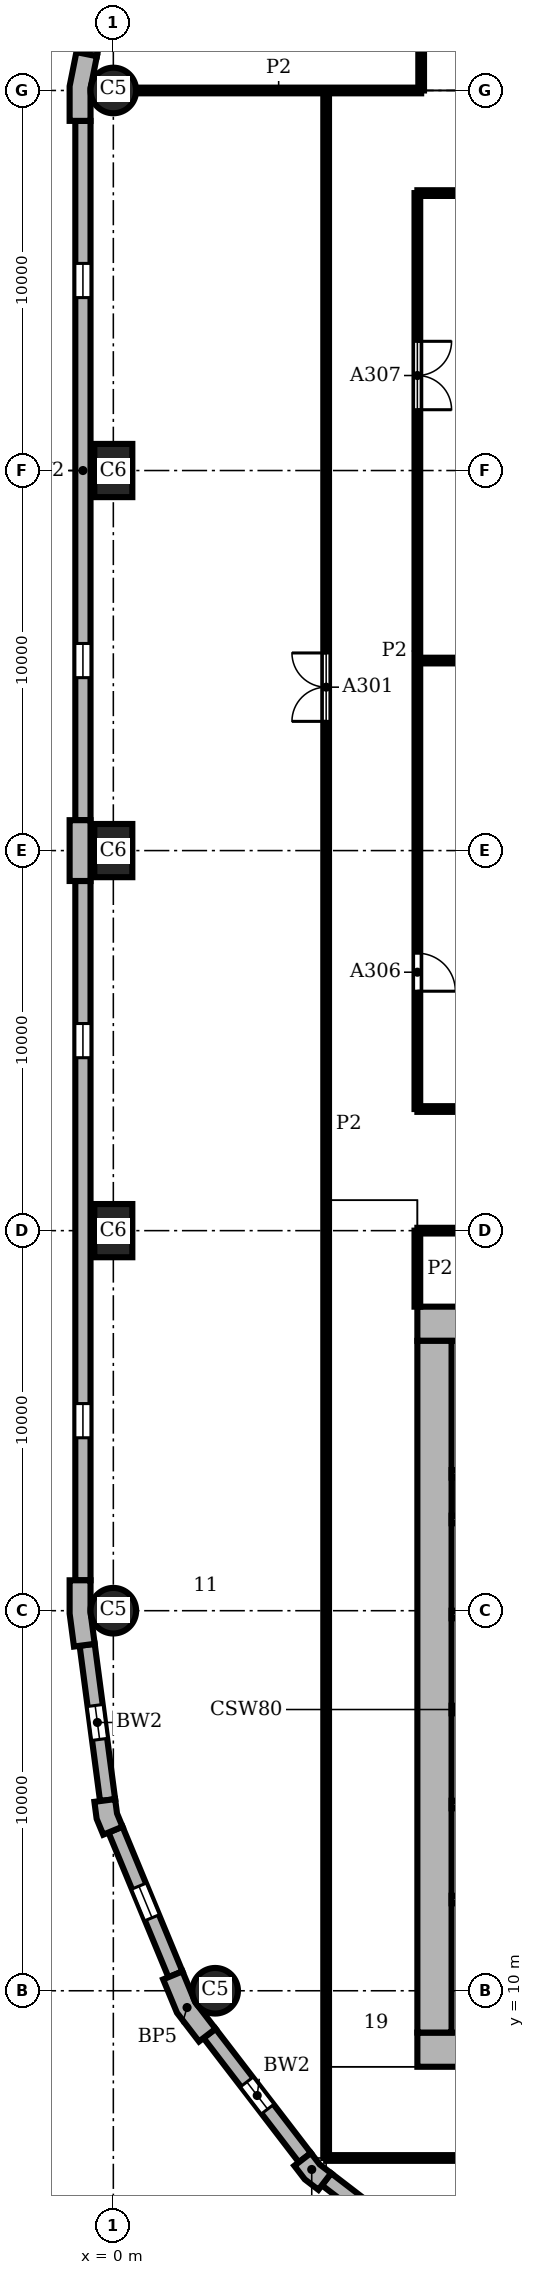
"""IFC4 building model, lengths in metres.
Left out: names, types, materials, properties, quantities, classifications, styles, units other than length and angle.
Written with IfcOpenShell. Run it as: python <this file> out.ifc"""

import sys

from ifc_helpers import new_model, si_unit, direction, frame, frame_2d, origin, origin_2d, place, context, subcontext, project, spatial, polyline, rectangle, circle, outline, extrude, element, fill, save


model = new_model("IFC4")
c1 = context("Model", 3, precision=1e-05, world=origin(), true_north=direction((0.0, 1.0)))
c2 = subcontext(c1, "Body", "Model", "MODEL_VIEW")
j1 = project(units=[si_unit("LENGTHUNIT", "METRE"), si_unit("PLANEANGLEUNIT", "RADIAN")], contexts=[c1])
p1 = place(None, origin())
s1 = spatial("IfcSite", under=j1, at=p1, CompositionType="ELEMENT")
p2 = place(p1, origin())
s2 = spatial("IfcBuilding", under=s1, at=p2, CompositionType="ELEMENT")
p3 = place(p2, frame((0.0, 0.0, 43.2)))
s3 = spatial("IfcBuildingStorey", under=s2, at=p3, CompositionType="ELEMENT", Elevation=43.2)
p4 = place(p3, frame((0.0, 60.0, 0.0), z_axis=(0.0, 0.0, 1.0), x_axis=(1.0, 0.0, 0.0)))
e1 = element("IfcColumn", 1, at=p4, inside=s3, PredefinedType="COLUMN", context=c2, shape_type="SweptSolid", body=[
    extrude(circle(Radius=0.6, at=origin_2d()), origin(), (0.0, 0.0, 1.0), 3.9),
])
for number, where, z_axis, x_axis in (
    (2, (0.0, 50.0, 0.0), (0.0, 0.0, 1.0), (0.0, 1.0, 0.0)),
    (3, (0.0, 40.0, 0.0), (0.0, 0.0, 1.0), (0.0, 1.0, 0.0)),
    (4, (0.0, 30.0, 0.0), (0.0, 0.0, 1.0), (0.0, 1.0, 0.0)),
):
    element("IfcColumn", number, at=place(p3, frame(where, z_axis=z_axis, x_axis=x_axis)), inside=s3, PredefinedType="COLUMN", context=c2, shape_type="SweptSolid", body=[
        extrude(rectangle(XDim=1.4, YDim=1.0, at=origin_2d()), origin(), (0.0, 0.0, 1.0), 3.9),
    ])
for number, where, z_axis, x_axis in (
    (5, (0.0, 20.0, 0.0), (0.0, 0.0, 1.0), (1.0, 0.0, 0.0)),
    (6, (2.679, 10.0, 0.0), (0.0, 0.0, 1.0), (1.0, 0.0, 0.0)),
):
    element("IfcColumn", number, at=place(p3, frame(where, z_axis=z_axis, x_axis=x_axis)), inside=s3, PredefinedType="COLUMN", context=c2, shape_type="SweptSolid", body=[
        extrude(circle(Radius=0.6, at=origin_2d()), origin(), (0.0, 0.0, 1.0), 3.9),
    ])
for number, where, z_axis, x_axis in (
    (7, (8.0, 8.45, 0.0), (0.0, 0.0, 1.0), (1.0, 0.0, 0.0)),
    (8, (28.0, 27.55, 0.0), (0.0, 0.0, 1.0), (-1.0, 0.0, 0.0)),
):
    element("IfcWall", number, at=place(p3, frame(where, z_axis=z_axis, x_axis=x_axis)), inside=s3, PredefinedType="SHEAR", context=c2, shape_type="SweptSolid", body=[
        extrude(rectangle(XDim=20.0, YDim=0.9, at=frame_2d((10.0, 0.0))), origin(), (0.0, 0.0, 1.0), 3.9),
    ])
p5 = place(p3, frame((8.45, 27.1, 0.0), z_axis=(0.0, 0.0, 1.0), x_axis=(0.0, -1.0, 0.0)))
e9 = element("IfcWall", 9, at=p5, inside=s3, PredefinedType="SHEAR", context=c2, shape_type="SweptSolid", body=[
    extrude(rectangle(XDim=18.2, YDim=0.9, at=frame_2d((9.1, 0.0))), origin(), (0.0, 0.0, 1.0), 3.9),
])
p6 = place(p3, origin())
e10 = element("IfcWall", 10, at=p6, inside=s3, PredefinedType="SOLIDWALL", context=c2, shape_type="SweptSolid", body=[
    extrude(outline(polyline([(-0.825, 60.98), (-0.972, 61.009), (-1.15, 60.113), (-1.15, 59.2), (-1.0, 59.2), (-0.6, 59.2), (-0.6, 60.059), (-0.432, 60.902), (-0.825, 60.98)])), origin(), (0.0, 0.0, 1.0), 3.9),
])
e11 = element("IfcWall", 11, at=p6, inside=s3, PredefinedType="SOLIDWALL", context=c2, shape_type="SweptSolid", body=[
    extrude(outline(polyline([(-1.0, 40.8), (-1.15, 40.8), (-1.15, 40.0), (-1.15, 39.2), (-1.0, 39.2), (-0.6, 39.2), (-0.6, 40.0), (-0.6, 40.8), (-1.0, 40.8)])), origin(), (0.0, 0.0, 1.0), 3.9),
])
e12 = element("IfcWall", 12, at=p6, inside=s3, PredefinedType="SOLIDWALL", context=c2, shape_type="SweptSolid", body=[
    extrude(outline(polyline([(-1.0, 20.8), (-1.15, 20.8), (-1.15, 19.925), (-1.036, 19.057), (-0.887, 19.076), (-0.49, 19.128), (-0.6, 19.961), (-0.6, 20.8), (-1.0, 20.8)])), origin(), (0.0, 0.0, 1.0), 3.9),
])
e13 = element("IfcWall", 13, at=p6, inside=s3, PredefinedType="SOLIDWALL", context=c2, shape_type="SweptSolid", body=[
    extrude(outline(polyline([(-0.349, 14.99), (-0.498, 14.971), (-0.439, 14.523), (-0.266, 14.106), (-0.128, 14.164), (0.242, 14.317), (0.097, 14.667), (0.047, 15.043), (-0.349, 14.99)])), origin(), (0.0, 0.0, 1.0), 3.9),
])
e14 = element("IfcWall", 14, at=p6, inside=s3, PredefinedType="SOLIDWALL", context=c2, shape_type="SweptSolid", body=[
    extrude(outline(polyline([(1.449, 10.356), (1.311, 10.299), (1.675, 9.42), (2.254, 8.665), (2.373, 8.757), (2.69, 9.0), (2.155, 9.698), (1.819, 10.51), (1.449, 10.356)])), origin(), (0.0, 0.0, 1.0), 3.9),
])
e15 = element("IfcWall", 15, at=p6, inside=s3, PredefinedType="SOLIDWALL", context=c2, shape_type="SweptSolid", body=[
    extrude(outline(polyline([(4.882, 5.487), (4.763, 5.396), (5.038, 5.038), (5.396, 4.763), (5.487, 4.882), (5.731, 5.199), (5.43, 5.43), (5.199, 5.731), (4.882, 5.487)])), origin(), (0.0, 0.0, 1.0), 3.9),
])
p7 = place(p3, frame((0.299, 65.602, 0.0), z_axis=(0.0, 0.0, 1.0), x_axis=(-0.195098533057, -0.98078364709, 0.0)))
e16 = element("IfcWall", 16, at=p7, inside=s3, PredefinedType="SOLIDWALL", context=c2, shape_type="SweptSolid", body=[
    extrude(rectangle(XDim=4.753, YDim=0.4, at=frame_2d((2.376, 0.0))), origin(), (0.0, 0.0, 1.0), 3.9),
])
p8 = place(p7, frame((0.226, 0.0, 0.9)))
e17 = element("IfcOpeningElement", 17, at=p8, cuts=e16, PredefinedType="OPENING", context=c2, shape_type="SweptSolid", body=[
    extrude(rectangle(XDim=4.3, YDim=2.35, at=frame_2d((2.15, 1.175))), frame((0.0, 0.21, 0.0), z_axis=(0.0, -1.0, 0.0), x_axis=(1.0, 0.0, 0.0)), (0.0, 0.0, 1.0), 0.42),
])
p9 = place(p3, frame((-0.8, 59.2, 0.0), z_axis=(0.0, 0.0, 1.0), x_axis=(0.0, -1.0, 0.0)))
e18 = element("IfcWall", 18, at=p9, inside=s3, PredefinedType="SOLIDWALL", context=c2, shape_type="SweptSolid", body=[
    extrude(rectangle(XDim=18.4, YDim=0.4, at=frame_2d((9.2, 0.0))), origin(), (0.0, 0.0, 1.0), 3.9),
])
p10 = place(p9, frame((3.75, 0.0, 0.9)))
e19 = element("IfcOpeningElement", 19, at=p10, cuts=e18, PredefinedType="OPENING", context=c2, shape_type="SweptSolid", body=[
    extrude(rectangle(XDim=0.9, YDim=2.35, at=frame_2d((0.45, 1.175))), frame((0.0, 0.21, 0.0), z_axis=(0.0, -1.0, 0.0), x_axis=(1.0, 0.0, 0.0)), (0.0, 0.0, 1.0), 0.42),
])
p11 = place(p9, frame((13.75, 0.0, 0.9)))
e20 = element("IfcOpeningElement", 20, at=p11, cuts=e18, PredefinedType="OPENING", context=c2, shape_type="SweptSolid", body=[
    extrude(rectangle(XDim=0.9, YDim=2.35, at=frame_2d((0.45, 1.175))), frame((0.0, 0.21, 0.0), z_axis=(0.0, -1.0, 0.0), x_axis=(1.0, 0.0, 0.0)), (0.0, 0.0, 1.0), 0.42),
])
p12 = place(p3, frame((-0.8, 39.2, 0.0), z_axis=(0.0, 0.0, 1.0), x_axis=(0.0, -1.0, 0.0)))
e21 = element("IfcWall", 21, at=p12, inside=s3, PredefinedType="SOLIDWALL", context=c2, shape_type="SweptSolid", body=[
    extrude(rectangle(XDim=18.4, YDim=0.4, at=frame_2d((9.2, 0.0))), origin(), (0.0, 0.0, 1.0), 3.9),
])
p13 = place(p12, frame((3.75, 0.0, 0.9)))
e22 = element("IfcOpeningElement", 22, at=p13, cuts=e21, PredefinedType="OPENING", context=c2, shape_type="SweptSolid", body=[
    extrude(rectangle(XDim=0.9, YDim=2.35, at=frame_2d((0.45, 1.175))), frame((0.0, 0.21, 0.0), z_axis=(0.0, -1.0, 0.0), x_axis=(1.0, 0.0, 0.0)), (0.0, 0.0, 1.0), 0.42),
])
p14 = place(p12, frame((13.75, 0.0, 0.9)))
e23 = element("IfcOpeningElement", 23, at=p14, cuts=e21, PredefinedType="OPENING", context=c2, shape_type="SweptSolid", body=[
    extrude(rectangle(XDim=0.9, YDim=2.35, at=frame_2d((0.45, 1.175))), frame((0.0, 0.21, 0.0), z_axis=(0.0, -1.0, 0.0), x_axis=(1.0, 0.0, 0.0)), (0.0, 0.0, 1.0), 0.42),
])
p15 = place(p3, frame((-0.689, 19.102, 0.0), z_axis=(0.0, 0.0, 1.0), x_axis=(0.130514280502, -0.991446429508, 0.0)))
e24 = element("IfcWall", 24, at=p15, inside=s3, PredefinedType="SOLIDWALL", context=c2, shape_type="SweptSolid", body=[
    extrude(rectangle(XDim=4.121, YDim=0.4, at=frame_2d((2.061, 0.0))), origin(), (0.0, 0.0, 1.0), 3.9),
])
p16 = place(p15, frame((1.611, 0.0, 0.9)))
e25 = element("IfcOpeningElement", 25, at=p16, cuts=e24, PredefinedType="OPENING", context=c2, shape_type="SweptSolid", body=[
    extrude(rectangle(XDim=0.9, YDim=2.35, at=frame_2d((0.45, 1.175))), frame((0.0, 0.21, 0.0), z_axis=(0.0, -1.0, 0.0), x_axis=(1.0, 0.0, 0.0)), (0.0, 0.0, 1.0), 0.42),
])
p17 = place(p3, frame((0.057, 14.24, 0.0), z_axis=(0.0, 0.0, 1.0), x_axis=(0.382721546029, -0.923863744394, 0.0)))
e26 = element("IfcWall", 26, at=p17, inside=s3, PredefinedType="SOLIDWALL", context=c2, shape_type="SweptSolid", body=[
    extrude(rectangle(XDim=4.121, YDim=0.4, at=frame_2d((2.061, 0.0))), origin(), (0.0, 0.0, 1.0), 3.9),
])
p18 = place(p17, frame((1.611, 0.0, 0.9)))
e27 = element("IfcOpeningElement", 27, at=p18, cuts=e26, PredefinedType="OPENING", context=c2, shape_type="SweptSolid", body=[
    extrude(rectangle(XDim=0.9, YDim=2.35, at=frame_2d((0.45, 1.175))), frame((0.0, 0.21, 0.0), z_axis=(0.0, -1.0, 0.0), x_axis=(1.0, 0.0, 0.0)), (0.0, 0.0, 1.0), 0.42),
])
p19 = place(p3, frame((2.532, 8.878, 0.0), z_axis=(0.0, 0.0, 1.0), x_axis=(0.608759824817, -0.793354571229, 0.0)))
e28 = element("IfcWall", 28, at=p19, inside=s3, PredefinedType="SOLIDWALL", context=c2, shape_type="SweptSolid", body=[
    extrude(rectangle(XDim=4.121, YDim=0.4, at=frame_2d((2.061, 0.0))), origin(), (0.0, 0.0, 1.0), 3.9),
])
p20 = place(p19, frame((1.611, 0.0, 0.9)))
e29 = element("IfcOpeningElement", 29, at=p20, cuts=e28, PredefinedType="OPENING", context=c2, shape_type="SweptSolid", body=[
    extrude(rectangle(XDim=0.9, YDim=2.35, at=frame_2d((0.45, 1.175))), frame((0.0, 0.21, 0.0), z_axis=(0.0, -1.0, 0.0), x_axis=(1.0, 0.0, 0.0)), (0.0, 0.0, 1.0), 0.42),
])
p21 = place(p3, frame((5.609, 5.041, 0.0), z_axis=(0.0, 0.0, 1.0), x_axis=(0.793354571229, -0.608759824817, 0.0)))
e30 = element("IfcWall", 30, at=p21, inside=s3, PredefinedType="SOLIDWALL", context=c2, shape_type="SweptSolid", body=[
    extrude(rectangle(XDim=4.121, YDim=0.4, at=frame_2d((2.061, 0.0))), origin(), (0.0, 0.0, 1.0), 3.9),
])
p22 = place(p21, frame((1.611, 0.0, 0.9)))
e31 = element("IfcOpeningElement", 31, at=p22, cuts=e30, PredefinedType="OPENING", context=c2, shape_type="SweptSolid", body=[
    extrude(rectangle(XDim=0.9, YDim=2.35, at=frame_2d((0.45, 1.175))), frame((0.0, 0.21, 0.0), z_axis=(0.0, -1.0, 0.0), x_axis=(1.0, 0.0, 0.0)), (0.0, 0.0, 1.0), 0.42),
])
p23 = place(p3, frame((8.9, 12.4, 0.0), z_axis=(0.0, 0.0, 1.0), x_axis=(1.0, 0.0, 0.0)))
e32 = element("IfcWall", 32, at=p23, inside=s3, PredefinedType="SHEAR", context=c2, shape_type="SweptSolid", body=[
    extrude(rectangle(XDim=4.9, YDim=0.2, at=frame_2d((2.45, 0.0))), origin(), (0.0, 0.0, 1.0), 3.58),
])
for number, where, z_axis, x_axis in (
    (33, (8.9, 14.9, 0.0), (0.0, 0.0, 1.0), (1.0, 0.0, 0.0)),
    (34, (8.9, 17.4, 0.0), (0.0, 0.0, 1.0), (1.0, 0.0, 0.0)),
    (35, (8.9, 19.9, 0.0), (0.0, 0.0, 1.0), (1.0, 0.0, 0.0)),
    (36, (8.9, 22.4, 0.0), (0.0, 0.0, 1.0), (1.0, 0.0, 0.0)),
):
    element("IfcWall", number, at=place(p3, frame(where, z_axis=z_axis, x_axis=x_axis)), inside=s3, PredefinedType="SHEAR", context=c2, shape_type="SweptSolid", body=[
        extrude(rectangle(XDim=2.8, YDim=0.2, at=frame_2d((1.4, 0.0))), origin(), (0.0, 0.0, 1.0), 3.58),
    ])
p24 = place(p3, frame((8.9, 23.6, 0.0), z_axis=(0.0, 0.0, 1.0), x_axis=(1.0, 0.0, 0.0)))
e37 = element("IfcWall", 37, at=p24, inside=s3, PredefinedType="SHEAR", context=c2, shape_type="SweptSolid", body=[
    extrude(rectangle(XDim=4.9, YDim=0.2, at=frame_2d((2.45, 0.0))), origin(), (0.0, 0.0, 1.0), 3.58),
])
p25 = place(p3, frame((5.6, 5.6, 0.0), z_axis=(0.0, 0.0, 1.0), x_axis=(0.0, 1.0, 0.0)))
e38 = element("IfcWall", 38, at=p25, inside=s3, PredefinedType="PARTITIONING", context=c2, shape_type="SweptSolid", body=[
    extrude(rectangle(XDim=54.4, YDim=0.15, at=frame_2d((27.2, 0.0))), origin(), (0.0, 0.0, 1.0), 3.58),
])
p26 = place(p25, frame((37.8, 0.0, 0.0)))
e39 = element("IfcOpeningElement", 39, at=p26, cuts=e38, PredefinedType="OPENING", context=c2, shape_type="SweptSolid", body=[
    extrude(rectangle(XDim=1.8, YDim=2.1, at=frame_2d((0.9, 1.05))), frame((0.0, 0.085, 0.0), z_axis=(0.0, -1.0, 0.0), x_axis=(1.0, 0.0, 0.0)), (0.0, 0.0, 1.0), 0.17),
])
p27 = place(p3, frame((8.0, 28.0, 0.0), z_axis=(0.0, 0.0, 1.0), x_axis=(0.0, 1.0, 0.0)))
e40 = element("IfcWall", 40, at=p27, inside=s3, PredefinedType="PARTITIONING", context=c2, shape_type="SweptSolid", body=[
    extrude(rectangle(XDim=2.0, YDim=0.15, at=frame_2d((1.0, 0.0))), origin(), (0.0, 0.0, 1.0), 3.58),
])
p28 = place(p3, frame((8.0, 33.2, 0.0), z_axis=(0.0, 0.0, 1.0), x_axis=(0.0, 1.0, 0.0)))
e41 = element("IfcWall", 41, at=p28, inside=s3, PredefinedType="PARTITIONING", context=c2, shape_type="SweptSolid", body=[
    extrude(rectangle(XDim=24.1, YDim=0.15, at=frame_2d((12.05, 0.0))), origin(), (0.0, 0.0, 1.0), 3.58),
])
p29 = place(p28, frame((3.1, 0.0, 0.0)))
e42 = element("IfcOpeningElement", 42, at=p29, cuts=e41, PredefinedType="OPENING", context=c2, shape_type="SweptSolid", body=[
    extrude(rectangle(XDim=1.0, YDim=2.1, at=frame_2d((0.5, 1.05))), frame((0.0, 0.085, 0.0), z_axis=(0.0, -1.0, 0.0), x_axis=(1.0, 0.0, 0.0)), (0.0, 0.0, 1.0), 0.17),
])
p30 = place(p28, frame((18.4, 0.0, 0.0)))
e43 = element("IfcOpeningElement", 43, at=p30, cuts=e41, PredefinedType="OPENING", context=c2, shape_type="SweptSolid", body=[
    extrude(rectangle(XDim=1.8, YDim=2.1, at=frame_2d((0.9, 1.05))), frame((0.0, 0.085, 0.0), z_axis=(0.0, -1.0, 0.0), x_axis=(1.0, 0.0, 0.0)), (0.0, 0.0, 1.0), 0.17),
])
p31 = place(p3, frame((8.1, 60.0, 0.0), z_axis=(0.0, 0.0, 1.0), x_axis=(0.0, 1.0, 0.0)))
e44 = element("IfcWall", 44, at=p31, inside=s3, PredefinedType="PARTITIONING", context=c2, shape_type="SweptSolid", body=[
    extrude(rectangle(XDim=6.4, YDim=0.15, at=frame_2d((3.2, 0.0))), origin(), (0.0, 0.0, 1.0), 3.58),
])
p32 = place(p31, frame((3.1, 0.0, 0.0)))
e45 = element("IfcOpeningElement", 45, at=p32, cuts=e44, PredefinedType="OPENING", context=c2, shape_type="SweptSolid", body=[
    extrude(rectangle(XDim=1.8, YDim=2.1, at=frame_2d((0.9, 1.05))), frame((0.0, 0.085, 0.0), z_axis=(0.0, -1.0, 0.0), x_axis=(1.0, 0.0, 0.0)), (0.0, 0.0, 1.0), 0.17),
])
p33 = place(p3, frame((5.6, 5.6, 0.0), z_axis=(0.0, 0.0, 1.0), x_axis=(1.0, 0.0, 0.0)))
e46 = element("IfcWall", 46, at=p33, inside=s3, PredefinedType="PARTITIONING", context=c2, shape_type="SweptSolid", body=[
    extrude(rectangle(XDim=25.4, YDim=0.15, at=frame_2d((12.7, 0.0))), origin(), (0.0, 0.0, 1.0), 3.58),
])
p34 = place(p3, frame((8.0, 30.0, 0.0), z_axis=(0.0, 0.0, 1.0), x_axis=(1.0, 0.0, 0.0)))
e47 = element("IfcWall", 47, at=p34, inside=s3, PredefinedType="PARTITIONING", context=c2, shape_type="SweptSolid", body=[
    extrude(rectangle(XDim=1.2, YDim=0.15, at=frame_2d((0.6, 0.0))), origin(), (0.0, 0.0, 1.0), 3.58),
])
for number, where, z_axis, x_axis in (
    (48, (8.0, 33.2, 0.0), (0.0, 0.0, 1.0), (1.0, 0.0, 0.0)),
    (49, (8.0, 45.0, 0.0), (0.0, 0.0, 1.0), (1.0, 0.0, 0.0)),
    (50, (8.0, 57.3, 0.0), (0.0, 0.0, 1.0), (1.0, 0.0, 0.0)),
):
    element("IfcWall", number, at=place(p3, frame(where, z_axis=z_axis, x_axis=x_axis)), inside=s3, PredefinedType="PARTITIONING", context=c2, shape_type="SweptSolid", body=[
        extrude(rectangle(XDim=5.8, YDim=0.15, at=frame_2d((2.9, 0.0))), origin(), (0.0, 0.0, 1.0), 3.58),
    ])
p35 = place(p3, frame((0.6, 60.0, 0.0), z_axis=(0.0, 0.0, 1.0), x_axis=(1.0, 0.0, 0.0)))
e51 = element("IfcWall", 51, at=p35, inside=s3, PredefinedType="PARTITIONING", context=c2, shape_type="SweptSolid", body=[
    extrude(rectangle(XDim=7.5, YDim=0.15, at=frame_2d((3.75, 0.0))), origin(), (0.0, 0.0, 1.0), 3.58),
])
p36 = place(p10, origin())
e52 = element("IfcWindow", 52, at=p36, inside=s3, PartitioningType="SINGLE_PANEL", PredefinedType="WINDOW", context=c2, shape_type="SweptSolid", body=[
    extrude(rectangle(XDim=0.9, YDim=2.35, at=frame_2d((0.45, 1.175))), frame((0.0, 0.16, 0.0), z_axis=(0.0, -1.0, 0.0), x_axis=(1.0, 0.0, 0.0)), (0.0, 0.0, 1.0), 0.06),
])
fill(e19, e52)
p37 = place(p11, origin())
e53 = element("IfcWindow", 53, at=p37, inside=s3, PartitioningType="SINGLE_PANEL", PredefinedType="WINDOW", context=c2, shape_type="SweptSolid", body=[
    extrude(rectangle(XDim=0.9, YDim=2.35, at=frame_2d((0.45, 1.175))), frame((0.0, 0.16, 0.0), z_axis=(0.0, -1.0, 0.0), x_axis=(1.0, 0.0, 0.0)), (0.0, 0.0, 1.0), 0.06),
])
fill(e20, e53)
p38 = place(p13, origin())
e54 = element("IfcWindow", 54, at=p38, inside=s3, PartitioningType="SINGLE_PANEL", PredefinedType="WINDOW", context=c2, shape_type="SweptSolid", body=[
    extrude(rectangle(XDim=0.9, YDim=2.35, at=frame_2d((0.45, 1.175))), frame((0.0, 0.16, 0.0), z_axis=(0.0, -1.0, 0.0), x_axis=(1.0, 0.0, 0.0)), (0.0, 0.0, 1.0), 0.06),
])
fill(e22, e54)
p39 = place(p14, origin())
e55 = element("IfcWindow", 55, at=p39, inside=s3, PartitioningType="SINGLE_PANEL", PredefinedType="WINDOW", context=c2, shape_type="SweptSolid", body=[
    extrude(rectangle(XDim=0.9, YDim=2.35, at=frame_2d((0.45, 1.175))), frame((0.0, 0.16, 0.0), z_axis=(0.0, -1.0, 0.0), x_axis=(1.0, 0.0, 0.0)), (0.0, 0.0, 1.0), 0.06),
])
fill(e23, e55)
p40 = place(p16, origin())
e56 = element("IfcWindow", 56, at=p40, inside=s3, PartitioningType="SINGLE_PANEL", PredefinedType="WINDOW", context=c2, shape_type="SweptSolid", body=[
    extrude(rectangle(XDim=0.9, YDim=2.35, at=frame_2d((0.45, 1.175))), frame((0.0, 0.16, 0.0), z_axis=(0.0, -1.0, 0.0), x_axis=(1.0, 0.0, 0.0)), (0.0, 0.0, 1.0), 0.06),
])
fill(e25, e56)
p41 = place(p18, origin())
e57 = element("IfcWindow", 57, at=p41, inside=s3, PartitioningType="SINGLE_PANEL", PredefinedType="WINDOW", context=c2, shape_type="SweptSolid", body=[
    extrude(rectangle(XDim=0.9, YDim=2.35, at=frame_2d((0.45, 1.175))), frame((0.0, 0.16, 0.0), z_axis=(0.0, -1.0, 0.0), x_axis=(1.0, 0.0, 0.0)), (0.0, 0.0, 1.0), 0.06),
])
fill(e27, e57)
p42 = place(p20, origin())
e58 = element("IfcWindow", 58, at=p42, inside=s3, PartitioningType="SINGLE_PANEL", PredefinedType="WINDOW", context=c2, shape_type="SweptSolid", body=[
    extrude(rectangle(XDim=0.9, YDim=2.35, at=frame_2d((0.45, 1.175))), frame((0.0, 0.16, 0.0), z_axis=(0.0, -1.0, 0.0), x_axis=(1.0, 0.0, 0.0)), (0.0, 0.0, 1.0), 0.06),
])
fill(e29, e58)
p43 = place(p26, origin())
e59 = element("IfcDoor", 59, at=p43, inside=s3, OperationType="DOUBLE_DOOR_SINGLE_SWING", PredefinedType="DOOR", context=c2, shape_type="SweptSolid", body=[
    extrude(rectangle(XDim=1.8, YDim=2.1, at=frame_2d((0.9, 1.05))), frame((0.0, 0.025, 0.0), z_axis=(0.0, -1.0, 0.0), x_axis=(1.0, 0.0, 0.0)), (0.0, 0.0, 1.0), 0.05),
])
fill(e39, e59)
p44 = place(p29, frame((1.0, 0.0, 0.0), z_axis=(0.0, 0.0, 1.0), x_axis=(-1.0, 0.0, 0.0)))
e60 = element("IfcDoor", 60, at=p44, inside=s3, OperationType="SINGLE_SWING_RIGHT", PredefinedType="DOOR", context=c2, shape_type="SweptSolid", body=[
    extrude(rectangle(XDim=1.0, YDim=2.1, at=frame_2d((0.5, 1.05))), frame((0.0, 0.025, 0.0), z_axis=(0.0, -1.0, 0.0), x_axis=(1.0, 0.0, 0.0)), (0.0, 0.0, 1.0), 0.05),
])
fill(e42, e60)
p45 = place(p30, frame((1.8, 0.0, 0.0), z_axis=(0.0, 0.0, 1.0), x_axis=(-1.0, 0.0, 0.0)))
e61 = element("IfcDoor", 61, at=p45, inside=s3, OperationType="DOUBLE_DOOR_SINGLE_SWING", PredefinedType="DOOR", context=c2, shape_type="SweptSolid", body=[
    extrude(rectangle(XDim=1.8, YDim=2.1, at=frame_2d((0.9, 1.05))), frame((0.0, 0.025, 0.0), z_axis=(0.0, -1.0, 0.0), x_axis=(1.0, 0.0, 0.0)), (0.0, 0.0, 1.0), 0.05),
])
fill(e43, e61)
save(model, sys.argv[1])
